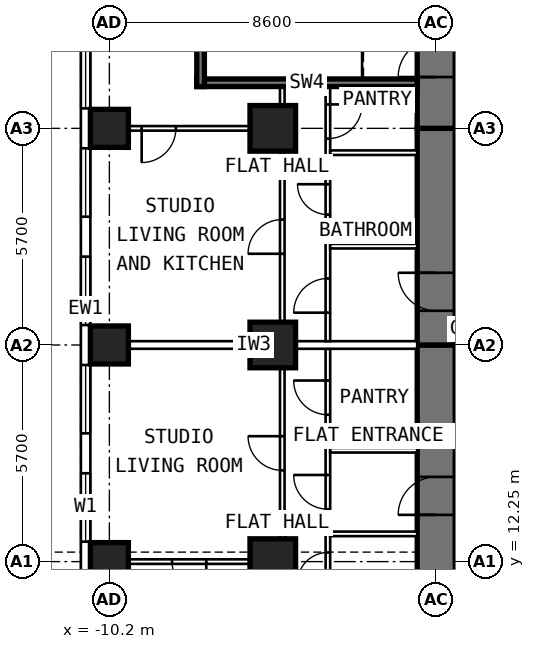
"""IFC4 building model, lengths in metres.
Left out: names, types, materials, properties, quantities, classifications, styles, units other than length and angle.
Written with IfcOpenShell. Run it as: python <this file> out.ifc"""

import sys

from ifc_helpers import new_model, si_unit, direction, frame, frame_2d, origin, origin_2d, place, context, subcontext, project, spatial, rectangle, extrude, element, fill, save


model = new_model("IFC4")
c1 = context("Model", 3, precision=1e-05, world=origin(), true_north=direction((0.0, 1.0)))
c2 = subcontext(c1, "Body", "Model", "MODEL_VIEW")
j1 = project(units=[si_unit("LENGTHUNIT", "METRE"), si_unit("PLANEANGLEUNIT", "RADIAN")], contexts=[c1])
p1 = place(None, origin())
s1 = spatial("IfcSite", under=j1, at=p1, CompositionType="ELEMENT")
p2 = place(p1, origin())
s2 = spatial("IfcBuilding", under=s1, at=p2, CompositionType="ELEMENT")
p3 = place(p2, frame((0.0, 0.0, 109.6)))
s3 = spatial("IfcBuildingStorey", under=s2, at=p3, CompositionType="ELEMENT", Elevation=109.6)
for number, where, z_axis, x_axis in (
    (1, (-10.2, 12.25, 0.0), (0.0, 0.0, 1.0), (0.0, 1.0, 0.0)),
    (2, (-10.2, 17.95, 0.0), (0.0, 0.0, 1.0), (0.0, 1.0, 0.0)),
    (3, (-10.2, 23.65, 0.0), (0.0, 0.0, 1.0), (0.0, 1.0, 0.0)),
):
    element("IfcColumn", number, at=place(p3, frame(where, z_axis=z_axis, x_axis=x_axis)), inside=s3, PredefinedType="COLUMN", context=c2, shape_type="SweptSolid", body=[
        extrude(rectangle(XDim=1.0, YDim=1.0, at=origin_2d()), origin(), (0.0, 0.0, 1.0), 3.6),
    ])
for number, where, z_axis, x_axis in (
    (4, (-5.9, 12.25, 0.0), (0.0, 0.0, 1.0), (0.0, 1.0, 0.0)),
    (5, (-5.9, 17.95, 0.0), (0.0, 0.0, 1.0), (0.0, 1.0, 0.0)),
    (6, (-5.9, 23.65, 0.0), (0.0, 0.0, 1.0), (0.0, 1.0, 0.0)),
):
    element("IfcColumn", number, at=place(p3, frame(where, z_axis=z_axis, x_axis=x_axis)), inside=s3, PredefinedType="COLUMN", context=c2, shape_type="SweptSolid", body=[
        extrude(rectangle(XDim=1.2, YDim=1.2, at=origin_2d()), origin(), (0.0, 0.0, 1.0), 3.6),
    ])
p4 = place(p3, frame((-1.6, 9.6, 0.0), z_axis=(0.0, 0.0, 1.0), x_axis=(0.0, 1.0, 0.0)))
e7 = element("IfcWall", 7, at=p4, inside=s3, PredefinedType="SHEAR", context=c2, shape_type="SweptSolid", body=[
    extrude(rectangle(XDim=8.35, YDim=1.0, at=frame_2d((4.175, 0.0))), origin(), (0.0, 0.0, 1.0), 3.6),
])
p5 = place(p4, frame((3.88, 0.0, 0.0)))
e8 = element("IfcOpeningElement", 8, at=p5, cuts=e7, PredefinedType="OPENING", context=c2, shape_type="SweptSolid", body=[
    extrude(rectangle(XDim=1.0, YDim=2.1, at=frame_2d((0.5, 1.05))), frame((0.0, 0.512, 0.0), z_axis=(0.0, -1.0, 0.0), x_axis=(1.0, 0.0, 0.0)), (0.0, 0.0, 1.0), 1.024),
])
p6 = place(p3, frame((-1.6, 17.95, 0.0), z_axis=(0.0, 0.0, 1.0), x_axis=(0.0, 1.0, 0.0)))
e9 = element("IfcWall", 9, at=p6, inside=s3, PredefinedType="SHEAR", context=c2, shape_type="SweptSolid", body=[
    extrude(rectangle(XDim=5.7, YDim=1.0, at=frame_2d((2.85, 0.0))), origin(), (0.0, 0.0, 1.0), 3.6),
])
p7 = place(p6, frame((0.9, 0.0, 0.0)))
e10 = element("IfcOpeningElement", 10, at=p7, cuts=e9, PredefinedType="OPENING", context=c2, shape_type="SweptSolid", body=[
    extrude(rectangle(XDim=1.0, YDim=2.1, at=frame_2d((0.5, 1.05))), frame((0.0, 0.512, 0.0), z_axis=(0.0, -1.0, 0.0), x_axis=(1.0, 0.0, 0.0)), (0.0, 0.0, 1.0), 1.024),
])
p8 = place(p3, frame((-1.6, 23.65, 0.0), z_axis=(0.0, 0.0, 1.0), x_axis=(0.0, 1.0, 0.0)))
e11 = element("IfcWall", 11, at=p8, inside=s3, PredefinedType="SHEAR", context=c2, shape_type="SweptSolid", body=[
    extrude(rectangle(XDim=10.745, YDim=1.0, at=frame_2d((5.373, 0.0))), origin(), (0.0, 0.0, 1.0), 3.6),
])
p9 = place(p8, frame((1.35, 0.0, 0.0)))
e12 = element("IfcOpeningElement", 12, at=p9, cuts=e11, PredefinedType="OPENING", context=c2, shape_type="SweptSolid", body=[
    extrude(rectangle(XDim=1.0, YDim=2.1, at=frame_2d((0.5, 1.05))), frame((0.0, 0.512, 0.0), z_axis=(0.0, -1.0, 0.0), x_axis=(1.0, 0.0, 0.0)), (0.0, 0.0, 1.0), 1.024),
])
p10 = place(p3, frame((-10.825, 6.148, 0.0), z_axis=(0.0, 0.0, 1.0), x_axis=(0.0, 1.0, 0.0)))
e13 = element("IfcWall", 13, at=p10, inside=s3, PredefinedType="SOLIDWALL", context=c2, shape_type="SweptSolid", body=[
    extrude(rectangle(XDim=25.487, YDim=0.25, at=frame_2d((12.744, 0.0))), origin(), (0.0, 0.0, 1.0), 3.3),
])
p11 = place(p10, frame((0.927, 0.0, 0.8)))
e14 = element("IfcOpeningElement", 14, at=p11, cuts=e13, PredefinedType="OPENING", context=c2, shape_type="SweptSolid", body=[
    extrude(rectangle(XDim=1.8, YDim=1.8, at=frame_2d((0.9, 0.9))), frame((0.0, 0.137, 0.0), z_axis=(0.0, -1.0, 0.0), x_axis=(1.0, 0.0, 0.0)), (0.0, 0.0, 1.0), 0.274),
])
p12 = place(p10, frame((3.777, 0.0, 0.8)))
e15 = element("IfcOpeningElement", 15, at=p12, cuts=e13, PredefinedType="OPENING", context=c2, shape_type="SweptSolid", body=[
    extrude(rectangle(XDim=1.8, YDim=1.8, at=frame_2d((0.9, 0.9))), frame((0.0, 0.137, 0.0), z_axis=(0.0, -1.0, 0.0), x_axis=(1.0, 0.0, 0.0)), (0.0, 0.0, 1.0), 0.274),
])
p13 = place(p10, frame((6.627, 0.0, 0.8)))
e16 = element("IfcOpeningElement", 16, at=p13, cuts=e13, PredefinedType="OPENING", context=c2, shape_type="SweptSolid", body=[
    extrude(rectangle(XDim=1.8, YDim=1.8, at=frame_2d((0.9, 0.9))), frame((0.0, 0.137, 0.0), z_axis=(0.0, -1.0, 0.0), x_axis=(1.0, 0.0, 0.0)), (0.0, 0.0, 1.0), 0.274),
])
p14 = place(p10, frame((9.477, 0.0, 0.8)))
e17 = element("IfcOpeningElement", 17, at=p14, cuts=e13, PredefinedType="OPENING", context=c2, shape_type="SweptSolid", body=[
    extrude(rectangle(XDim=1.8, YDim=1.8, at=frame_2d((0.9, 0.9))), frame((0.0, 0.137, 0.0), z_axis=(0.0, -1.0, 0.0), x_axis=(1.0, 0.0, 0.0)), (0.0, 0.0, 1.0), 0.274),
])
p15 = place(p10, frame((12.327, 0.0, 0.8)))
e18 = element("IfcOpeningElement", 18, at=p15, cuts=e13, PredefinedType="OPENING", context=c2, shape_type="SweptSolid", body=[
    extrude(rectangle(XDim=1.8, YDim=1.8, at=frame_2d((0.9, 0.9))), frame((0.0, 0.137, 0.0), z_axis=(0.0, -1.0, 0.0), x_axis=(1.0, 0.0, 0.0)), (0.0, 0.0, 1.0), 0.274),
])
p16 = place(p10, frame((15.177, 0.0, 0.8)))
e19 = element("IfcOpeningElement", 19, at=p16, cuts=e13, PredefinedType="OPENING", context=c2, shape_type="SweptSolid", body=[
    extrude(rectangle(XDim=1.8, YDim=1.8, at=frame_2d((0.9, 0.9))), frame((0.0, 0.137, 0.0), z_axis=(0.0, -1.0, 0.0), x_axis=(1.0, 0.0, 0.0)), (0.0, 0.0, 1.0), 0.274),
])
p17 = place(p10, frame((18.027, 0.0, 0.8)))
e20 = element("IfcOpeningElement", 20, at=p17, cuts=e13, PredefinedType="OPENING", context=c2, shape_type="SweptSolid", body=[
    extrude(rectangle(XDim=1.8, YDim=1.8, at=frame_2d((0.9, 0.9))), frame((0.0, 0.137, 0.0), z_axis=(0.0, -1.0, 0.0), x_axis=(1.0, 0.0, 0.0)), (0.0, 0.0, 1.0), 0.274),
])
p18 = place(p10, frame((20.877, 0.0, 0.8)))
e21 = element("IfcOpeningElement", 21, at=p18, cuts=e13, PredefinedType="OPENING", context=c2, shape_type="SweptSolid", body=[
    extrude(rectangle(XDim=1.8, YDim=1.8, at=frame_2d((0.9, 0.9))), frame((0.0, 0.137, 0.0), z_axis=(0.0, -1.0, 0.0), x_axis=(1.0, 0.0, 0.0)), (0.0, 0.0, 1.0), 0.274),
])
p19 = place(p3, frame((-4.45, 10.1, 0.0), z_axis=(0.0, 0.0, 1.0), x_axis=(0.0, 1.0, 0.0)))
e22 = element("IfcWall", 22, at=p19, inside=s3, PredefinedType="PARTITIONING", context=c2, shape_type="SweptSolid", body=[
    extrude(rectangle(XDim=7.75, YDim=0.12, at=frame_2d((3.875, 0.0))), origin(), (0.0, 0.0, 1.0), 3.3),
])
p20 = place(p19, frame((1.59, 0.0, 0.0)))
e23 = element("IfcOpeningElement", 23, at=p20, cuts=e22, PredefinedType="OPENING", context=c2, shape_type="SweptSolid", body=[
    extrude(rectangle(XDim=0.8, YDim=2.1, at=frame_2d((0.4, 1.05))), frame((0.0, 0.072, 0.0), z_axis=(0.0, -1.0, 0.0), x_axis=(1.0, 0.0, 0.0)), (0.0, 0.0, 1.0), 0.144),
])
p21 = place(p19, frame((3.53, 0.0, 0.0)))
e24 = element("IfcOpeningElement", 24, at=p21, cuts=e22, PredefinedType="OPENING", context=c2, shape_type="SweptSolid", body=[
    extrude(rectangle(XDim=0.9, YDim=2.1, at=frame_2d((0.45, 1.05))), frame((0.0, 0.072, 0.0), z_axis=(0.0, -1.0, 0.0), x_axis=(1.0, 0.0, 0.0)), (0.0, 0.0, 1.0), 0.144),
])
p22 = place(p19, frame((6.015, 0.0, 0.0)))
e25 = element("IfcOpeningElement", 25, at=p22, cuts=e22, PredefinedType="OPENING", context=c2, shape_type="SweptSolid", body=[
    extrude(rectangle(XDim=0.9, YDim=2.1, at=frame_2d((0.45, 1.05))), frame((0.0, 0.072, 0.0), z_axis=(0.0, -1.0, 0.0), x_axis=(1.0, 0.0, 0.0)), (0.0, 0.0, 1.0), 0.144),
])
p23 = place(p3, frame((-5.65, 9.6, 0.0), z_axis=(0.0, 0.0, 1.0), x_axis=(0.0, 1.0, 0.0)))
e26 = element("IfcWall", 26, at=p23, inside=s3, PredefinedType="PARTITIONING", context=c2, shape_type="SweptSolid", body=[
    extrude(rectangle(XDim=8.1, YDim=0.12, at=frame_2d((4.05, 0.0))), origin(), (0.0, 0.0, 1.0), 3.3),
])
p24 = place(p23, frame((5.05, 0.0, 0.0)))
e27 = element("IfcOpeningElement", 27, at=p24, cuts=e26, PredefinedType="OPENING", context=c2, shape_type="SweptSolid", body=[
    extrude(rectangle(XDim=0.9, YDim=2.1, at=frame_2d((0.45, 1.05))), frame((0.0, 0.072, 0.0), z_axis=(0.0, -1.0, 0.0), x_axis=(1.0, 0.0, 0.0)), (0.0, 0.0, 1.0), 0.144),
])
p25 = place(p3, frame((-5.71, 12.25, 0.0), z_axis=(0.0, 0.0, 1.0), x_axis=(-1.0, 0.0, 0.0)))
e28 = element("IfcWall", 28, at=p25, inside=s3, PredefinedType="PARTITIONING", context=c2, shape_type="SweptSolid", body=[
    extrude(rectangle(XDim=4.99, YDim=0.12, at=frame_2d((2.495, 0.0))), origin(), (0.0, 0.0, 1.0), 2.3),
])
p26 = place(p25, frame((1.94, 0.0, 0.0)))
e29 = element("IfcOpeningElement", 29, at=p26, cuts=e28, PredefinedType="OPENING", context=c2, shape_type="SweptSolid", body=[
    extrude(rectangle(XDim=0.9, YDim=2.1, at=frame_2d((0.45, 1.05))), frame((0.0, 0.072, 0.0), z_axis=(0.0, -1.0, 0.0), x_axis=(1.0, 0.0, 0.0)), (0.0, 0.0, 1.0), 0.144),
])
for number, where, z_axis, x_axis in (
    (30, (-2.1, 12.98, 0.0), (0.0, 0.0, 1.0), (-1.0, 0.0, 0.0)),
    (31, (-2.1, 15.18, 0.0), (0.0, 0.0, 1.0), (-1.0, 0.0, 0.0)),
):
    element("IfcWall", number, at=place(p3, frame(where, z_axis=z_axis, x_axis=x_axis)), inside=s3, PredefinedType="PARTITIONING", context=c2, shape_type="SweptSolid", body=[
        extrude(rectangle(XDim=2.29, YDim=0.12, at=frame_2d((1.145, 0.0))), origin(), (0.0, 0.0, 1.0), 3.3),
    ])
p27 = place(p3, frame((-4.45, 18.05, 0.0), z_axis=(0.0, 0.0, 1.0), x_axis=(0.0, 1.0, 0.0)))
e32 = element("IfcWall", 32, at=p27, inside=s3, PredefinedType="PARTITIONING", context=c2, shape_type="SweptSolid", body=[
    extrude(rectangle(XDim=6.7, YDim=0.12, at=frame_2d((3.35, 0.0))), origin(), (0.0, 0.0, 1.0), 3.3),
])
p28 = place(p27, frame((0.75, 0.0, 0.0)))
e33 = element("IfcOpeningElement", 33, at=p28, cuts=e32, PredefinedType="OPENING", context=c2, shape_type="SweptSolid", body=[
    extrude(rectangle(XDim=0.9, YDim=2.1, at=frame_2d((0.45, 1.05))), frame((0.0, 0.072, 0.0), z_axis=(0.0, -1.0, 0.0), x_axis=(1.0, 0.0, 0.0)), (0.0, 0.0, 1.0), 0.144),
])
p29 = place(p27, frame((3.33, 0.0, 0.0)))
e34 = element("IfcOpeningElement", 34, at=p29, cuts=e32, PredefinedType="OPENING", context=c2, shape_type="SweptSolid", body=[
    extrude(rectangle(XDim=0.8, YDim=2.1, at=frame_2d((0.4, 1.05))), frame((0.0, 0.072, 0.0), z_axis=(0.0, -1.0, 0.0), x_axis=(1.0, 0.0, 0.0)), (0.0, 0.0, 1.0), 0.144),
])
p30 = place(p27, frame((5.33, 0.0, 0.0)))
e35 = element("IfcOpeningElement", 35, at=p30, cuts=e32, PredefinedType="OPENING", context=c2, shape_type="SweptSolid", body=[
    extrude(rectangle(XDim=0.9, YDim=2.1, at=frame_2d((0.45, 1.05))), frame((0.0, 0.072, 0.0), z_axis=(0.0, -1.0, 0.0), x_axis=(1.0, 0.0, 0.0)), (0.0, 0.0, 1.0), 0.144),
])
p31 = place(p3, frame((-5.65, 18.05, 0.0), z_axis=(0.0, 0.0, 1.0), x_axis=(0.0, 1.0, 0.0)))
e36 = element("IfcWall", 36, at=p31, inside=s3, PredefinedType="PARTITIONING", context=c2, shape_type="SweptSolid", body=[
    extrude(rectangle(XDim=6.7, YDim=0.12, at=frame_2d((3.35, 0.0))), origin(), (0.0, 0.0, 1.0), 3.3),
])
p32 = place(p31, frame((2.3, 0.0, 0.0)))
e37 = element("IfcOpeningElement", 37, at=p32, cuts=e36, PredefinedType="OPENING", context=c2, shape_type="SweptSolid", body=[
    extrude(rectangle(XDim=0.9, YDim=2.1, at=frame_2d((0.45, 1.05))), frame((0.0, 0.072, 0.0), z_axis=(0.0, -1.0, 0.0), x_axis=(1.0, 0.0, 0.0)), (0.0, 0.0, 1.0), 0.144),
])
for number, where, z_axis, x_axis in (
    (38, (-2.1, 20.55, 0.0), (0.0, 0.0, 1.0), (-1.0, 0.0, 0.0)),
    (39, (-2.1, 23.01, 0.0), (0.0, 0.0, 1.0), (-1.0, 0.0, 0.0)),
):
    element("IfcWall", number, at=place(p3, frame(where, z_axis=z_axis, x_axis=x_axis)), inside=s3, PredefinedType="PARTITIONING", context=c2, shape_type="SweptSolid", body=[
        extrude(rectangle(XDim=2.29, YDim=0.12, at=frame_2d((1.145, 0.0))), origin(), (0.0, 0.0, 1.0), 3.3),
    ])
p33 = place(p3, frame((-2.1, 17.95, 0.0), z_axis=(0.0, 0.0, 1.0), x_axis=(-1.0, 0.0, 0.0)))
e40 = element("IfcWall", 40, at=p33, inside=s3, PredefinedType="PARTITIONING", context=c2, shape_type="SweptSolid", body=[
    extrude(rectangle(XDim=8.6, YDim=0.2, at=frame_2d((4.3, 0.0))), origin(), (0.0, 0.0, 1.0), 3.3),
])
p34 = place(p3, frame((-5.71, 23.65, 0.0), z_axis=(0.0, 0.0, 1.0), x_axis=(-1.0, 0.0, 0.0)))
e41 = element("IfcWall", 41, at=p34, inside=s3, PredefinedType="PARTITIONING", context=c2, shape_type="SweptSolid", body=[
    extrude(rectangle(XDim=4.99, YDim=0.12, at=frame_2d((2.495, 0.0))), origin(), (0.0, 0.0, 1.0), 3.3),
])
p35 = place(p34, frame((2.74, 0.0, 0.0)))
e42 = element("IfcOpeningElement", 42, at=p35, cuts=e41, PredefinedType="OPENING", context=c2, shape_type="SweptSolid", body=[
    extrude(rectangle(XDim=0.9, YDim=2.1, at=frame_2d((0.45, 1.05))), frame((0.0, 0.072, 0.0), z_axis=(0.0, -1.0, 0.0), x_axis=(1.0, 0.0, 0.0)), (0.0, 0.0, 1.0), 0.144),
])
p36 = place(p3, frame((-2.1, 24.85, 0.0), z_axis=(0.0, 0.0, 1.0), x_axis=(-1.0, 0.0, 0.0)))
e43 = element("IfcWall", 43, at=p36, inside=s3, PredefinedType="SHEAR", context=c2, shape_type="SweptSolid", body=[
    extrude(rectangle(XDim=5.8, YDim=0.2, at=frame_2d((2.9, 0.0))), origin(), (0.0, 0.0, 1.0), 3.28),
])
p37 = place(p3, frame((-7.8, 24.75, 0.0), z_axis=(0.0, 0.0, 1.0), x_axis=(0.0, 1.0, 0.0)))
e44 = element("IfcWall", 44, at=p37, inside=s3, PredefinedType="SHEAR", context=c2, shape_type="SweptSolid", body=[
    extrude(rectangle(XDim=4.0, YDim=0.2, at=frame_2d((2.0, 0.0))), origin(), (0.0, 0.0, 1.0), 3.28),
])
p38 = place(p13, origin())
e45 = element("IfcWindow", 45, at=p38, inside=s3, PartitioningType="SINGLE_PANEL", PredefinedType="WINDOW", context=c2, shape_type="SweptSolid", body=[
    extrude(rectangle(XDim=1.8, YDim=1.8, at=frame_2d((0.9, 0.9))), frame((0.0, 0.03, 0.0), z_axis=(0.0, -1.0, 0.0), x_axis=(1.0, 0.0, 0.0)), (0.0, 0.0, 1.0), 0.06),
])
fill(e16, e45)
p39 = place(p14, origin())
e46 = element("IfcWindow", 46, at=p39, inside=s3, PartitioningType="SINGLE_PANEL", PredefinedType="WINDOW", context=c2, shape_type="SweptSolid", body=[
    extrude(rectangle(XDim=1.8, YDim=1.8, at=frame_2d((0.9, 0.9))), frame((0.0, 0.03, 0.0), z_axis=(0.0, -1.0, 0.0), x_axis=(1.0, 0.0, 0.0)), (0.0, 0.0, 1.0), 0.06),
])
fill(e17, e46)
p40 = place(p15, origin())
e47 = element("IfcWindow", 47, at=p40, inside=s3, PartitioningType="SINGLE_PANEL", PredefinedType="WINDOW", context=c2, shape_type="SweptSolid", body=[
    extrude(rectangle(XDim=1.8, YDim=1.8, at=frame_2d((0.9, 0.9))), frame((0.0, 0.03, 0.0), z_axis=(0.0, -1.0, 0.0), x_axis=(1.0, 0.0, 0.0)), (0.0, 0.0, 1.0), 0.06),
])
fill(e18, e47)
p41 = place(p16, origin())
e48 = element("IfcWindow", 48, at=p41, inside=s3, PartitioningType="SINGLE_PANEL", PredefinedType="WINDOW", context=c2, shape_type="SweptSolid", body=[
    extrude(rectangle(XDim=1.8, YDim=1.8, at=frame_2d((0.9, 0.9))), frame((0.0, 0.03, 0.0), z_axis=(0.0, -1.0, 0.0), x_axis=(1.0, 0.0, 0.0)), (0.0, 0.0, 1.0), 0.06),
])
fill(e19, e48)
p42 = place(p17, origin())
e49 = element("IfcWindow", 49, at=p42, inside=s3, PartitioningType="SINGLE_PANEL", PredefinedType="WINDOW", context=c2, shape_type="SweptSolid", body=[
    extrude(rectangle(XDim=1.8, YDim=1.8, at=frame_2d((0.9, 0.9))), frame((0.0, 0.03, 0.0), z_axis=(0.0, -1.0, 0.0), x_axis=(1.0, 0.0, 0.0)), (0.0, 0.0, 1.0), 0.06),
])
fill(e20, e49)
p43 = place(p26, origin())
e50 = element("IfcDoor", 50, at=p43, inside=s3, OperationType="SINGLE_SWING_LEFT", PredefinedType="DOOR", context=c2, shape_type="SweptSolid", body=[
    extrude(rectangle(XDim=0.9, YDim=2.1, at=frame_2d((0.45, 1.05))), frame((0.0, 0.025, 0.0), z_axis=(0.0, -1.0, 0.0), x_axis=(1.0, 0.0, 0.0)), (0.0, 0.0, 1.0), 0.05),
])
fill(e29, e50)
p44 = place(p5, origin())
e51 = element("IfcDoor", 51, at=p44, inside=s3, OperationType="SINGLE_SWING_LEFT", PredefinedType="DOOR", context=c2, shape_type="SweptSolid", body=[
    extrude(rectangle(XDim=1.0, YDim=2.1, at=frame_2d((0.5, 1.05))), frame((0.0, 0.25, 0.0), z_axis=(0.0, -1.0, 0.0), x_axis=(1.0, 0.0, 0.0)), (0.0, 0.0, 1.0), 0.5),
])
fill(e8, e51)
p45 = place(p24, origin())
e52 = element("IfcDoor", 52, at=p45, inside=s3, OperationType="SINGLE_SWING_RIGHT", PredefinedType="DOOR", context=c2, shape_type="SweptSolid", body=[
    extrude(rectangle(XDim=0.9, YDim=2.1, at=frame_2d((0.45, 1.05))), frame((0.0, 0.025, 0.0), z_axis=(0.0, -1.0, 0.0), x_axis=(1.0, 0.0, 0.0)), (0.0, 0.0, 1.0), 0.05),
])
fill(e27, e52)
p46 = place(p20, origin())
e53 = element("IfcDoor", 53, at=p46, inside=s3, OperationType="SINGLE_SWING_LEFT", PredefinedType="DOOR", context=c2, shape_type="SweptSolid", body=[
    extrude(rectangle(XDim=0.8, YDim=2.1, at=frame_2d((0.4, 1.05))), frame((0.0, 0.025, 0.0), z_axis=(0.0, -1.0, 0.0), x_axis=(1.0, 0.0, 0.0)), (0.0, 0.0, 1.0), 0.05),
])
fill(e23, e53)
p47 = place(p21, origin())
e54 = element("IfcDoor", 54, at=p47, inside=s3, OperationType="SINGLE_SWING_RIGHT", PredefinedType="DOOR", context=c2, shape_type="SweptSolid", body=[
    extrude(rectangle(XDim=0.9, YDim=2.1, at=frame_2d((0.45, 1.05))), frame((0.0, 0.025, 0.0), z_axis=(0.0, -1.0, 0.0), x_axis=(1.0, 0.0, 0.0)), (0.0, 0.0, 1.0), 0.05),
])
fill(e24, e54)
p48 = place(p22, origin())
e55 = element("IfcDoor", 55, at=p48, inside=s3, OperationType="SINGLE_SWING_RIGHT", PredefinedType="DOOR", context=c2, shape_type="SweptSolid", body=[
    extrude(rectangle(XDim=0.9, YDim=2.1, at=frame_2d((0.45, 1.05))), frame((0.0, 0.025, 0.0), z_axis=(0.0, -1.0, 0.0), x_axis=(1.0, 0.0, 0.0)), (0.0, 0.0, 1.0), 0.05),
])
fill(e25, e55)
p49 = place(p7, origin())
e56 = element("IfcDoor", 56, at=p49, inside=s3, OperationType="SINGLE_SWING_RIGHT", PredefinedType="DOOR", context=c2, shape_type="SweptSolid", body=[
    extrude(rectangle(XDim=1.0, YDim=2.1, at=frame_2d((0.5, 1.05))), frame((0.0, 0.25, 0.0), z_axis=(0.0, -1.0, 0.0), x_axis=(1.0, 0.0, 0.0)), (0.0, 0.0, 1.0), 0.5),
])
fill(e10, e56)
p50 = place(p32, origin())
e57 = element("IfcDoor", 57, at=p50, inside=s3, OperationType="SINGLE_SWING_LEFT", PredefinedType="DOOR", context=c2, shape_type="SweptSolid", body=[
    extrude(rectangle(XDim=0.9, YDim=2.1, at=frame_2d((0.45, 1.05))), frame((0.0, 0.025, 0.0), z_axis=(0.0, -1.0, 0.0), x_axis=(1.0, 0.0, 0.0)), (0.0, 0.0, 1.0), 0.05),
])
fill(e37, e57)
p51 = place(p28, origin())
e58 = element("IfcDoor", 58, at=p51, inside=s3, OperationType="SINGLE_SWING_LEFT", PredefinedType="DOOR", context=c2, shape_type="SweptSolid", body=[
    extrude(rectangle(XDim=0.9, YDim=2.1, at=frame_2d((0.45, 1.05))), frame((0.0, 0.025, 0.0), z_axis=(0.0, -1.0, 0.0), x_axis=(1.0, 0.0, 0.0)), (0.0, 0.0, 1.0), 0.05),
])
fill(e33, e58)
p52 = place(p29, origin())
e59 = element("IfcDoor", 59, at=p52, inside=s3, OperationType="SINGLE_SWING_RIGHT", PredefinedType="DOOR", context=c2, shape_type="SweptSolid", body=[
    extrude(rectangle(XDim=0.8, YDim=2.1, at=frame_2d((0.4, 1.05))), frame((0.0, 0.025, 0.0), z_axis=(0.0, -1.0, 0.0), x_axis=(1.0, 0.0, 0.0)), (0.0, 0.0, 1.0), 0.05),
])
fill(e34, e59)
p53 = place(p30, frame((0.9, 0.0, 0.0), z_axis=(0.0, 0.0, 1.0), x_axis=(-1.0, 0.0, 0.0)))
e60 = element("IfcDoor", 60, at=p53, inside=s3, OperationType="SINGLE_SWING_LEFT", PredefinedType="DOOR", context=c2, shape_type="SweptSolid", body=[
    extrude(rectangle(XDim=0.9, YDim=2.1, at=frame_2d((0.45, 1.05))), frame((0.0, 0.025, 0.0), z_axis=(0.0, -1.0, 0.0), x_axis=(1.0, 0.0, 0.0)), (0.0, 0.0, 1.0), 0.05),
])
fill(e35, e60)
p54 = place(p35, origin())
e61 = element("IfcDoor", 61, at=p54, inside=s3, OperationType="SINGLE_SWING_RIGHT", PredefinedType="DOOR", context=c2, shape_type="SweptSolid", body=[
    extrude(rectangle(XDim=0.9, YDim=2.1, at=frame_2d((0.45, 1.05))), frame((0.0, 0.025, 0.0), z_axis=(0.0, -1.0, 0.0), x_axis=(1.0, 0.0, 0.0)), (0.0, 0.0, 1.0), 0.05),
])
fill(e42, e61)
p55 = place(p9, origin())
e62 = element("IfcDoor", 62, at=p55, inside=s3, OperationType="SINGLE_SWING_LEFT", PredefinedType="DOOR", context=c2, shape_type="SweptSolid", body=[
    extrude(rectangle(XDim=1.0, YDim=2.1, at=frame_2d((0.5, 1.05))), frame((0.0, 0.25, 0.0), z_axis=(0.0, -1.0, 0.0), x_axis=(1.0, 0.0, 0.0)), (0.0, 0.0, 1.0), 0.5),
])
fill(e12, e62)
save(model, sys.argv[1])
